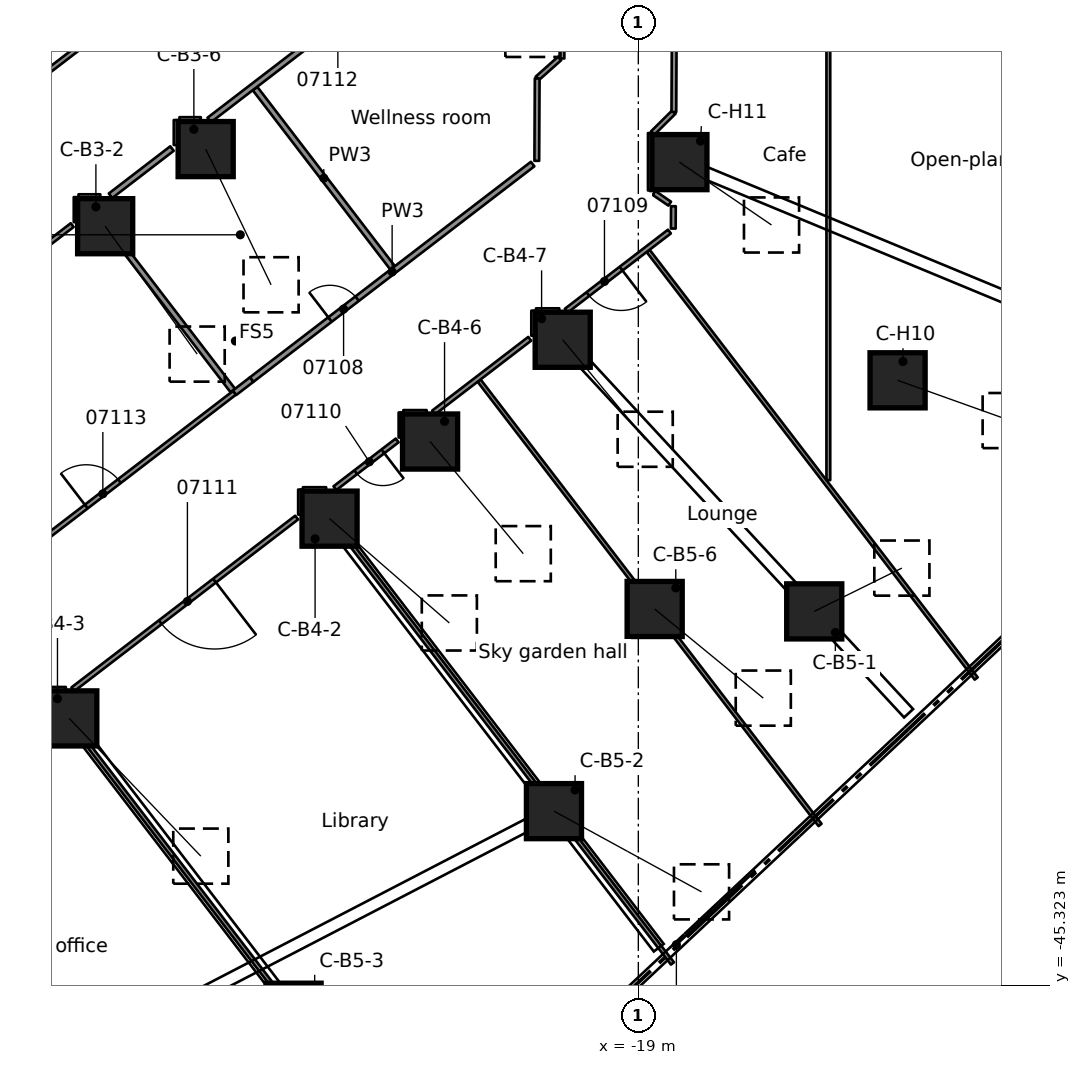
"""IFC4 building model, lengths in metres.
Left out: names, types, materials, properties, quantities, classifications, styles, units other than length and angle.
Written with IfcOpenShell. Run it as: python <this file> out.ifc"""

import sys

from ifc_helpers import new_model, si_unit, direction, frame, frame_2d, origin, origin_2d, place, context, subcontext, project, spatial, rectangle, extrude, element, fill, save


model = new_model("IFC4")
c1 = context("Model", 3, precision=1e-05, world=origin(), true_north=direction((0.0, 1.0)))
c2 = subcontext(c1, "Body", "Model", "MODEL_VIEW")
j1 = project(units=[si_unit("LENGTHUNIT", "METRE"), si_unit("PLANEANGLEUNIT", "RADIAN")], contexts=[c1])
p1 = place(None, origin())
s1 = spatial("IfcSite", under=j1, at=p1, CompositionType="ELEMENT")
p2 = place(p1, origin())
s2 = spatial("IfcBuilding", under=s1, at=p2, CompositionType="ELEMENT")
p3 = place(p2, frame((0.0, 0.0, 33.3)))
s3 = spatial("IfcBuildingStorey", under=s2, at=p3, CompositionType="ELEMENT", Elevation=33.3)
p4 = place(p3, frame((-33.03, -25.345, 0.601), z_axis=(0.484075605361, -0.672785526742, 0.559491236125), x_axis=(0.811723079597, 0.584042500208, 0.0)))
e1 = element("IfcColumn", 1, at=p4, inside=s3, PredefinedType="COLUMN", context=c2, shape_type="SweptSolid", body=[
    extrude(rectangle(XDim=1.45, YDim=1.45, at=origin_2d()), origin(), (0.0, 0.0, 1.0), 5.001),
])
p5 = place(p3, frame((-30.385, -23.316, 0.591), z_axis=(0.353875242444, -0.734106635021, 0.579534089768), x_axis=(0.90080181457, 0.434230458244, 0.0)))
e2 = element("IfcColumn", 2, at=p5, inside=s3, PredefinedType="COLUMN", context=c2, shape_type="SweptSolid", body=[
    extrude(rectangle(XDim=1.45, YDim=1.45, at=origin_2d()), origin(), (0.0, 0.0, 1.0), 4.863),
])
p6 = place(p3, frame((-27.125, -33.04, 0.603), z_axis=(0.626915434331, -0.545922874152, 0.555828439066), x_axis=(0.656712169931, 0.754141316906, 0.0)))
e3 = element("IfcColumn", 3, at=p6, inside=s3, PredefinedType="COLUMN", context=c2, shape_type="SweptSolid", body=[
    extrude(rectangle(XDim=1.45, YDim=1.45, at=origin_2d()), origin(), (0.0, 0.0, 1.0), 5.028),
])
p7 = place(p3, frame((-33.974, -38.296, 0.637), z_axis=(0.606713355896, -0.635258027433, 0.477855775689), x_axis=(0.723167492828, 0.690672699125, 0.0)))
e4 = element("IfcColumn", 4, at=p7, inside=s3, PredefinedType="COLUMN", context=c2, shape_type="SweptSolid", body=[
    extrude(rectangle(XDim=1.45, YDim=1.45, at=origin_2d()), origin(), (0.0, 0.0, 1.0), 5.705),
])
p8 = place(p3, frame((-24.48, -31.011, 0.583), z_axis=(0.514125147633, -0.618557618127, 0.594190041678), x_axis=(0.769039707257, 0.639201008026, 0.0)))
e5 = element("IfcColumn", 5, at=p8, inside=s3, PredefinedType="COLUMN", context=c2, shape_type="SweptSolid", body=[
    extrude(rectangle(XDim=1.45, YDim=1.45, at=origin_2d()), origin(), (0.0, 0.0, 1.0), 4.769),
])
p9 = place(p3, frame((-20.99, -28.333, 0.552), z_axis=(0.48599783766, -0.586072291187, 0.648325050644), x_axis=(0.769766563569, 0.638325495035, 0.0)))
e6 = element("IfcColumn", 6, at=p9, inside=s3, PredefinedType="COLUMN", context=c2, shape_type="SweptSolid", body=[
    extrude(rectangle(XDim=1.45, YDim=1.45, at=origin_2d()), origin(), (0.0, 0.0, 1.0), 4.467),
])
p10 = place(p3, frame((-14.371, -35.48, 0.466), z_axis=(0.575966078213, 0.284446512266, 0.7663897562), x_axis=(-0.44280386504, 0.896618501429, 0.0)))
e7 = element("IfcColumn", 7, at=p10, inside=s3, PredefinedType="COLUMN", context=c2, shape_type="SweptSolid", body=[
    extrude(rectangle(XDim=1.45, YDim=1.45, at=origin_2d()), origin(), (0.0, 0.0, 1.0), 4.004),
])
p11 = place(p3, frame((-21.22, -40.736, 0.615), z_axis=(0.743612862638, -0.406754599494, 0.530651115432), x_axis=(0.479895272144, 0.877325782007, 0.0)))
e8 = element("IfcColumn", 8, at=p11, inside=s3, PredefinedType="COLUMN", context=c2, shape_type="SweptSolid", body=[
    extrude(rectangle(XDim=1.45, YDim=1.45, at=origin_2d()), origin(), (0.0, 0.0, 1.0), 5.222),
])
p12 = place(p3, frame((-28.072, -45.988, 0.641), z_axis=(0.719277998117, -0.515378613328, 0.465858397314), x_axis=(0.582441324018, 0.812872747775, 0.0)))
e9 = element("IfcColumn", 9, at=p12, inside=s3, PredefinedType="COLUMN", context=c2, shape_type="SweptSolid", body=[
    extrude(rectangle(XDim=1.45, YDim=1.45, at=origin_2d()), origin(), (0.0, 0.0, 1.0), 5.832),
])
p13 = place(p3, frame((-18.57, -35.417, 0.574), z_axis=(0.612119529002, -0.502213041434, 0.610812363356), x_axis=(0.634287264239, 0.7730974495, 0.0)))
e10 = element("IfcColumn", 10, at=p13, inside=s3, PredefinedType="COLUMN", context=c2, shape_type="SweptSolid", body=[
    extrude(rectangle(XDim=1.45, YDim=1.45, at=origin_2d()), origin(), (0.0, 0.0, 1.0), 4.669),
])
p14 = place(p3, frame((-12.178, -29.4, 0.53), z_axis=(0.687967306264, -0.24591316534, 0.682808685229), x_axis=(0.33659198018, 0.941650592778, 0.0)))
e11 = element("IfcColumn", 11, at=p14, inside=s3, PredefinedType="COLUMN", context=c2, shape_type="SweptSolid", body=[
    extrude(rectangle(XDim=1.45, YDim=1.45, at=origin_2d()), origin(), (0.0, 0.0, 1.0), 4.307),
])
p15 = place(p3, frame((-17.919, -23.659, 0.508), z_axis=(0.579239562537, -0.395280825563, 0.712905742812), x_axis=(0.563672389997, 0.825998448397, 0.0)))
e12 = element("IfcColumn", 12, at=p15, inside=s3, PredefinedType="COLUMN", context=c2, shape_type="SweptSolid", body=[
    extrude(rectangle(XDim=1.45, YDim=1.45, at=origin_2d()), origin(), (0.0, 0.0, 1.0), 4.185),
])
p16 = place(p3, frame((-23.659, -17.919, 0.508), z_axis=(0.450505155937, -0.537268679687, 0.713012952408), x_axis=(0.766266875891, 0.642522431446, 0.0)))
e13 = element("IfcColumn", 13, at=p16, inside=s3, PredefinedType="COLUMN", context=c2, shape_type="SweptSolid", body=[
    extrude(rectangle(XDim=1.45, YDim=1.45, at=origin_2d()), origin(), (0.0, 0.0, 1.0), 4.184),
])
p17 = place(p3, frame((-34.501, -37.664, 0.0), z_axis=(0.0, 0.0, 1.0), x_axis=(0.608768597096, -0.793347839973, 0.0)))
e14 = element("IfcWall", 14, at=p17, inside=s3, PredefinedType="PARTITIONING", context=c2, shape_type="SweptSolid", body=[
    extrude(rectangle(XDim=16.162, YDim=0.1, at=frame_2d((8.081, 0.0))), origin(), (0.0, 0.0, 1.0), 3.56),
])
p18 = place(p3, frame((-33.482, -24.701, 0.0), z_axis=(0.0, 0.0, 1.0), x_axis=(0.608730316576, -0.793377212731, 0.0)))
e15 = element("IfcWall", 15, at=p18, inside=s3, PredefinedType="PARTITIONING", context=c2, shape_type="SweptSolid", body=[
    extrude(rectangle(XDim=6.261, YDim=0.15, at=frame_2d((3.13, 0.0))), origin(), (0.0, 0.0, 1.0), 3.56),
])
p19 = place(p3, frame((-27.599, -32.368, 0.0), z_axis=(0.0, 0.0, 1.0), x_axis=(0.608787633684, -0.793333232049, 0.0)))
e16 = element("IfcWall", 16, at=p19, inside=s3, PredefinedType="PARTITIONING", context=c2, shape_type="SweptSolid", body=[
    extrude(rectangle(XDim=15.6, YDim=0.1, at=frame_2d((7.8, 0.0))), origin(), (0.0, 0.0, 1.0), 3.56),
])
p20 = place(p3, frame((-29.087, -21.722, 0.0), z_axis=(0.0, 0.0, 1.0), x_axis=(0.608744291625, -0.793366489975, 0.0)))
e17 = element("IfcWall", 17, at=p20, inside=s3, PredefinedType="PARTITIONING", context=c2, shape_type="SweptSolid", body=[
    extrude(rectangle(XDim=5.948, YDim=0.15, at=frame_2d((2.974, 0.0))), origin(), (0.0, 0.0, 1.0), 3.56),
])
p21 = place(p3, frame((-23.19, -29.408, 0.0), z_axis=(0.0, 0.0, 1.0), x_axis=(0.608771263508, -0.793345793917, 0.0)))
e18 = element("IfcWall", 18, at=p21, inside=s3, PredefinedType="PARTITIONING", context=c2, shape_type="SweptSolid", body=[
    extrude(rectangle(XDim=14.738, YDim=0.1, at=frame_2d((7.369, 0.0))), origin(), (0.0, 0.0, 1.0), 3.56),
])
p22 = place(p3, frame((-18.742, -25.995, 0.0), z_axis=(0.0, 0.0, 1.0), x_axis=(0.608756044644, -0.79335747183, 0.0)))
e19 = element("IfcWall", 19, at=p22, inside=s3, PredefinedType="PARTITIONING", context=c2, shape_type="SweptSolid", body=[
    extrude(rectangle(XDim=14.181, YDim=0.1, at=frame_2d((7.091, 0.0))), origin(), (0.0, 0.0, 1.0), 3.56),
])
p23 = place(p3, frame((-18.586, -24.471, 0.0), z_axis=(0.0, 0.0, 1.0), x_axis=(0.8260511917, -0.563595092855, 0.0)))
e20 = element("IfcWall", 20, at=p23, inside=s3, PredefinedType="PARTITIONING", context=c2, shape_type="SweptSolid", body=[
    extrude(rectangle(XDim=0.499, YDim=0.125, at=frame_2d((0.249, 0.0))), origin(), (0.0, 0.0, 1.0), 3.56),
])
p24 = place(p3, frame((-34.541, -37.531, 0.0), z_axis=(0.0, 0.0, 1.0), x_axis=(1.0, 0.0, 0.0)))
e21 = element("IfcWall", 21, at=p24, inside=s3, PredefinedType="PARTITIONING", context=c2, shape_type="SweptSolid", body=[
    extrude(rectangle(XDim=0.477, YDim=0.125, at=frame_2d((0.239, 0.0))), origin(), (0.0, 0.0, 1.0), 3.56),
])
p25 = place(p3, frame((-27.826, -32.275, 0.0), z_axis=(0.0, 0.0, 1.0), x_axis=(1.0, 0.0, 0.0)))
e22 = element("IfcWall", 22, at=p25, inside=s3, PredefinedType="PARTITIONING", context=c2, shape_type="SweptSolid", body=[
    extrude(rectangle(XDim=0.611, YDim=0.125, at=frame_2d((0.305, 0.0))), origin(), (0.0, 0.0, 1.0), 3.56),
])
p26 = place(p3, frame((-25.183, -30.246, 0.0), z_axis=(0.0, 0.0, 1.0), x_axis=(1.0, 0.0, 0.0)))
e23 = element("IfcWall", 23, at=p26, inside=s3, PredefinedType="PARTITIONING", context=c2, shape_type="SweptSolid", body=[
    extrude(rectangle(XDim=0.613, YDim=0.125, at=frame_2d((0.307, 0.0))), origin(), (0.0, 0.0, 1.0), 3.56),
])
p27 = place(p3, frame((-21.692, -27.568, 0.0), z_axis=(0.0, 0.0, 1.0), x_axis=(1.0, 0.0, 0.0)))
e24 = element("IfcWall", 24, at=p27, inside=s3, PredefinedType="PARTITIONING", context=c2, shape_type="SweptSolid", body=[
    extrude(rectangle(XDim=0.612, YDim=0.125, at=frame_2d((0.306, 0.0))), origin(), (0.0, 0.0, 1.0), 3.56),
])
p28 = place(p3, frame((-33.731, -24.58, 0.0), z_axis=(0.0, 0.0, 1.0), x_axis=(1.0, 0.0, 0.0)))
e25 = element("IfcWall", 25, at=p28, inside=s3, PredefinedType="PARTITIONING", context=c2, shape_type="SweptSolid", body=[
    extrude(rectangle(XDim=0.573, YDim=0.15, at=frame_2d((0.287, 0.0))), origin(), (0.0, 0.0, 1.0), 3.56),
])
p29 = place(p3, frame((-18.622, -22.894, 0.0), z_axis=(0.0, 0.0, 1.0), x_axis=(0.70974550127, 0.704458177202, 0.0)))
e26 = element("IfcWall", 26, at=p29, inside=s3, PredefinedType="PARTITIONING", context=c2, shape_type="SweptSolid", body=[
    extrude(rectangle(XDim=0.785, YDim=0.125, at=frame_2d((0.393, 0.0))), origin(), (0.0, 0.0, 1.0), 3.56),
])
p30 = place(p3, frame((-31.075, -22.551, 0.0), z_axis=(0.0, 0.0, 1.0), x_axis=(1.0, 0.0, 0.0)))
e27 = element("IfcWall", 27, at=p30, inside=s3, PredefinedType="PARTITIONING", context=c2, shape_type="SweptSolid", body=[
    extrude(rectangle(XDim=0.562, YDim=0.15, at=frame_2d((0.281, 0.0))), origin(), (0.0, 0.0, 1.0), 3.56),
])
p31 = place(p3, frame((-21.661, -21.457, 0.0), z_axis=(0.0, 0.0, 1.0), x_axis=(0.746332821082, 0.665572926264, 0.0)))
e28 = element("IfcWall", 28, at=p31, inside=s3, PredefinedType="PARTITIONING", context=c2, shape_type="SweptSolid", body=[
    extrude(rectangle(XDim=0.789, YDim=0.125, at=frame_2d((0.395, 0.0))), origin(), (0.0, 0.0, 1.0), 3.56),
])
p32 = place(p3, frame((-27.991, -33.012, 0.0), z_axis=(0.0, 0.0, 1.0), x_axis=(-0.793332599064, -0.608788458549, 0.0)))
e29 = element("IfcWall", 29, at=p32, inside=s3, PredefinedType="PARTITIONING", context=c2, shape_type="SweptSolid", body=[
    extrude(rectangle(XDim=7.423, YDim=0.125, at=frame_2d((3.711, 0.0))), origin(), (0.0, 0.0, 1.0), 3.56),
])
p33 = place(p32, frame((2.723, 0.0, 0.0)))
e30 = element("IfcOpeningElement", 30, at=p33, cuts=e29, PredefinedType="OPENING", context=c2, shape_type="SweptSolid", body=[
    extrude(rectangle(XDim=1.8, YDim=2.1, at=frame_2d((0.9, 1.05))), frame((0.0, 0.073, 0.0), z_axis=(0.0, -1.0, 0.0), x_axis=(1.0, 0.0, 0.0)), (0.0, 0.0, 1.0), 0.145),
])
p34 = place(p3, frame((-25.346, -30.982, 0.0), z_axis=(0.0, 0.0, 1.0), x_axis=(-0.79329604463, -0.608836090893, 0.0)))
e31 = element("IfcWall", 31, at=p34, inside=s3, PredefinedType="PARTITIONING", context=c2, shape_type="SweptSolid", body=[
    extrude(rectangle(XDim=2.065, YDim=0.125, at=frame_2d((1.032, 0.0))), origin(), (0.0, 0.0, 1.0), 3.56),
])
p35 = place(p34, frame((0.473, 0.0, 0.0)))
e32 = element("IfcOpeningElement", 32, at=p35, cuts=e31, PredefinedType="OPENING", context=c2, shape_type="SweptSolid", body=[
    extrude(rectangle(XDim=0.9, YDim=2.1, at=frame_2d((0.45, 1.05))), frame((0.0, 0.073, 0.0), z_axis=(0.0, -1.0, 0.0), x_axis=(1.0, 0.0, 0.0)), (0.0, 0.0, 1.0), 0.145),
])
p36 = place(p3, frame((-24.386, -30.246, 0.0), z_axis=(0.0, 0.0, 1.0), x_axis=(0.793523683955, 0.60853936849, 0.0)))
e33 = element("IfcWall", 33, at=p36, inside=s3, PredefinedType="PARTITIONING", context=c2, shape_type="SweptSolid", body=[
    extrude(rectangle(XDim=3.185, YDim=0.125, at=frame_2d((1.592, 0.0))), origin(), (0.0, 0.0, 1.0), 3.56),
])
p37 = place(p3, frame((-18.182, -25.486, 0.0), z_axis=(0.0, 0.0, 1.0), x_axis=(-0.793435168534, -0.608654773523, 0.0)))
e34 = element("IfcWall", 34, at=p37, inside=s3, PredefinedType="PARTITIONING", context=c2, shape_type="SweptSolid", body=[
    extrude(rectangle(XDim=3.421, YDim=0.125, at=frame_2d((1.71, 0.0))), origin(), (0.0, 0.0, 1.0), 3.56),
])
p38 = place(p37, frame((1.604, 0.0, 0.0)))
e35 = element("IfcOpeningElement", 35, at=p38, cuts=e34, PredefinedType="OPENING", context=c2, shape_type="SweptSolid", body=[
    extrude(rectangle(XDim=1.1, YDim=2.1, at=frame_2d((0.55, 1.05))), frame((0.0, 0.073, 0.0), z_axis=(0.0, -1.0, 0.0), x_axis=(1.0, 0.0, 0.0)), (0.0, 0.0, 1.0), 0.145),
])
p39 = place(p3, frame((-36.283, -34.836, 0.0), z_axis=(0.0, 0.0, 1.0), x_axis=(0.793406369961, 0.608692313165, 0.0)))
e36 = element("IfcWall", 36, at=p39, inside=s3, PredefinedType="PARTITIONING", context=c2, shape_type="SweptSolid", body=[
    extrude(rectangle(XDim=8.392, YDim=0.125, at=frame_2d((4.196, 0.0))), origin(), (0.0, 0.0, 1.0), 3.56),
])
p40 = place(p39, frame((3.473, 0.0, 0.0)))
e37 = element("IfcOpeningElement", 37, at=p40, cuts=e36, PredefinedType="OPENING", context=c2, shape_type="SweptSolid", body=[
    extrude(rectangle(XDim=1.1, YDim=2.1, at=frame_2d((0.55, 1.05))), frame((0.0, 0.073, 0.0), z_axis=(0.0, -1.0, 0.0), x_axis=(1.0, 0.0, 0.0)), (0.0, 0.0, 1.0), 0.145),
])
p41 = place(p3, frame((-29.176, -29.382, 0.0), z_axis=(0.0, 0.0, 1.0), x_axis=(0.793471421385, 0.608607511821, 0.0)))
e38 = element("IfcWall", 38, at=p41, inside=s3, PredefinedType="PARTITIONING", context=c2, shape_type="SweptSolid", body=[
    extrude(rectangle(XDim=9.32, YDim=0.15, at=frame_2d((4.66, 0.0))), origin(), (0.0, 0.0, 1.0), 3.56),
])
p42 = place(p41, frame((2.6, 0.0, 0.0)))
e39 = element("IfcOpeningElement", 39, at=p42, cuts=e38, PredefinedType="OPENING", context=c2, shape_type="SweptSolid", body=[
    extrude(rectangle(XDim=0.9, YDim=2.1, at=frame_2d((0.45, 1.05))), frame((0.0, 0.085, 0.0), z_axis=(0.0, -1.0, 0.0), x_axis=(1.0, 0.0, 0.0)), (0.0, 0.0, 1.0), 0.17),
])
p43 = place(p3, frame((-29.625, -29.727, 0.0), z_axis=(0.0, 0.0, 1.0), x_axis=(0.792960485916, 0.609273065035, 0.0)))
e40 = element("IfcWall", 40, at=p43, inside=s3, PredefinedType="PARTITIONING", context=c2, shape_type="SweptSolid", body=[
    extrude(rectangle(XDim=0.566, YDim=0.15, at=frame_2d((0.283, 0.0))), origin(), (0.0, 0.0, 1.0), 3.56),
])
p44 = place(p3, frame((-39.784, -29.835, 0.0), z_axis=(0.0, 0.0, 1.0), x_axis=(0.793235050969, 0.608915555652, 0.0)))
e41 = element("IfcWall", 41, at=p44, inside=s3, PredefinedType="PARTITIONING", context=c2, shape_type="SweptSolid", body=[
    extrude(rectangle(XDim=7.421, YDim=0.125, at=frame_2d((3.711, 0.0))), origin(), (0.0, 0.0, 1.0), 3.56),
])
p45 = place(p3, frame((-32.889, -24.544, 0.0), z_axis=(0.0, 0.0, 1.0), x_axis=(0.793242097783, 0.608906375648, 0.0)))
e42 = element("IfcWall", 42, at=p45, inside=s3, PredefinedType="PARTITIONING", context=c2, shape_type="SweptSolid", body=[
    extrude(rectangle(XDim=2.04, YDim=0.15, at=frame_2d((1.02, 0.0))), origin(), (0.0, 0.0, 1.0), 3.56),
])
p46 = place(p3, frame((-24.685, -18.25, 0.0), z_axis=(0.0, 0.0, 1.0), x_axis=(-0.793443961698, -0.608643310687, 0.0)))
e43 = element("IfcWall", 43, at=p46, inside=s3, PredefinedType="PARTITIONING", context=c2, shape_type="SweptSolid", body=[
    extrude(rectangle(XDim=7.067, YDim=0.15, at=frame_2d((3.533, 0.0))), origin(), (0.0, 0.0, 1.0), 3.56),
])
p47 = place(p46, frame((2.35, 0.0, 0.0)))
e44 = element("IfcOpeningElement", 44, at=p47, cuts=e43, PredefinedType="OPENING", context=c2, shape_type="SweptSolid", body=[
    extrude(rectangle(XDim=0.9, YDim=2.1, at=frame_2d((0.45, 1.05))), frame((0.0, 0.085, 0.0), z_axis=(0.0, -1.0, 0.0), x_axis=(1.0, 0.0, 0.0)), (0.0, 0.0, 1.0), 0.17),
])
p48 = place(p3, frame((-35.081, -21.687, 0.0), z_axis=(0.0, 0.0, 1.0), x_axis=(0.793358624224, 0.608754542792, 0.0)))
e45 = element("IfcWall", 45, at=p48, inside=s3, PredefinedType="PARTITIONING", context=c2, shape_type="SweptSolid", body=[
    extrude(rectangle(XDim=9.567, YDim=0.125, at=frame_2d((4.784, 0.0))), origin(), (0.0, 0.0, 1.0), 3.56),
])
p49 = place(p48, frame((6.334, 0.0, 0.0)))
e46 = element("IfcOpeningElement", 46, at=p49, cuts=e45, PredefinedType="OPENING", context=c2, shape_type="SweptSolid", body=[
    extrude(rectangle(XDim=1.8, YDim=2.1, at=frame_2d((0.9, 1.05))), frame((0.0, 0.073, 0.0), z_axis=(0.0, -1.0, 0.0), x_axis=(1.0, 0.0, 0.0)), (0.0, 0.0, 1.0), 0.145),
])
p50 = place(p48, frame((1.85, 0.0, 0.0)))
e47 = element("IfcOpeningElement", 47, at=p50, cuts=e45, PredefinedType="OPENING", context=c2, shape_type="SweptSolid", body=[
    extrude(rectangle(XDim=1.1, YDim=2.1, at=frame_2d((0.55, 1.05))), frame((0.0, 0.073, 0.0), z_axis=(0.0, -1.0, 0.0), x_axis=(1.0, 0.0, 0.0)), (0.0, 0.0, 1.0), 0.145),
])
p51 = place(p3, frame((-18.08, -25.407, 0.0), z_axis=(0.0, 0.0, 1.0), x_axis=(0.005398592424, 0.999985427494, 0.0)))
e48 = element("IfcWall", 48, at=p51, inside=s3, PredefinedType="PARTITIONING", context=c2, shape_type="SweptSolid", body=[
    extrude(rectangle(XDim=0.588, YDim=0.125, at=frame_2d((0.294, 0.0))), origin(), (0.0, 0.0, 1.0), 3.56),
])
p52 = place(p3, frame((-18.065, -22.341, 0.0), z_axis=(0.0, 0.0, 1.0), x_axis=(0.004875578002, 0.999988114299, 0.0)))
e49 = element("IfcWall", 49, at=p52, inside=s3, PredefinedType="PARTITIONING", context=c2, shape_type="SweptSolid", body=[
    extrude(rectangle(XDim=3.455, YDim=0.125, at=frame_2d((1.728, 0.0))), origin(), (0.0, 0.0, 1.0), 3.56),
])
p53 = place(p3, frame((-21.672, -23.625, 0.0), z_axis=(0.0, 0.0, 1.0), x_axis=(0.005180110678, 0.999986583137, 0.0)))
e50 = element("IfcWall", 50, at=p53, inside=s3, PredefinedType="PARTITIONING", context=c2, shape_type="SweptSolid", body=[
    extrude(rectangle(XDim=2.168, YDim=0.125, at=frame_2d((1.084, 0.0))), origin(), (0.0, 0.0, 1.0), 3.56),
])
p54 = place(p3, frame((-14.0, -32.027, 0.0), z_axis=(0.0, 0.0, 1.0), x_axis=(0.0, 1.0, 0.0)))
e51 = element("IfcWall", 51, at=p54, inside=s3, PredefinedType="PARTITIONING", context=c2, shape_type="SweptSolid", body=[
    extrude(rectangle(XDim=16.913, YDim=0.1, at=frame_2d((8.457, 0.0))), origin(), (0.0, 0.0, 1.0), 3.56),
])
p55 = place(p3, frame((-18.684, -24.405, 0.0), z_axis=(0.0, 0.0, 1.0), x_axis=(0.0, 1.0, 0.0)))
e52 = element("IfcWall", 52, at=p55, inside=s3, PredefinedType="PARTITIONING", context=c2, shape_type="SweptSolid", body=[
    extrude(rectangle(XDim=1.511, YDim=0.125, at=frame_2d((0.755, 0.0))), origin(), (0.0, 0.0, 1.0), 3.56),
])
p56 = place(p3, frame((-21.009, -20.932, 0.0), z_axis=(0.0, 0.0, 1.0), x_axis=(0.0, 1.0, 0.0)))
e53 = element("IfcWall", 53, at=p56, inside=s3, PredefinedType="PARTITIONING", context=c2, shape_type="SweptSolid", body=[
    extrude(rectangle(XDim=1.505, YDim=0.125, at=frame_2d((0.752, 0.0))), origin(), (0.0, 0.0, 1.0), 3.56),
])
for number, where, z_axis, x_axis in (
    (54, (-21.754, -28.227, 0.0), (0.0, 0.0, 1.0), (0.0, 1.0, 0.0)),
    (55, (-25.245, -30.905, 0.0), (0.0, 0.0, 1.0), (0.0, 1.0, 0.0)),
):
    element("IfcWall", number, at=place(p3, frame(where, z_axis=z_axis, x_axis=x_axis)), inside=s3, PredefinedType="PARTITIONING", context=c2, shape_type="SweptSolid", body=[
        extrude(rectangle(XDim=0.659, YDim=0.125, at=frame_2d((0.33, 0.0))), origin(), (0.0, 0.0, 1.0), 3.56),
    ])
p57 = place(p3, frame((-27.889, -32.934, 0.0), z_axis=(0.0, 0.0, 1.0), x_axis=(0.0, 1.0, 0.0)))
e56 = element("IfcWall", 56, at=p57, inside=s3, PredefinedType="PARTITIONING", context=c2, shape_type="SweptSolid", body=[
    extrude(rectangle(XDim=0.659, YDim=0.125, at=frame_2d((0.33, 0.0))), origin(), (0.0, 0.0, 1.0), 3.56),
])
p58 = place(p3, frame((-31.15, -23.209, 0.0), z_axis=(0.0, 0.0, 1.0), x_axis=(0.0, 1.0, 0.0)))
e57 = element("IfcWall", 57, at=p58, inside=s3, PredefinedType="PARTITIONING", context=c2, shape_type="SweptSolid", body=[
    extrude(rectangle(XDim=0.658, YDim=0.15, at=frame_2d((0.329, 0.0))), origin(), (0.0, 0.0, 1.0), 3.56),
])
p59 = place(p3, frame((-33.794, -25.239, 0.0), z_axis=(0.0, 0.0, 1.0), x_axis=(0.0, 1.0, 0.0)))
e58 = element("IfcWall", 58, at=p59, inside=s3, PredefinedType="PARTITIONING", context=c2, shape_type="SweptSolid", body=[
    extrude(rectangle(XDim=0.659, YDim=0.125, at=frame_2d((0.33, 0.0))), origin(), (0.0, 0.0, 1.0), 3.56),
])
p60 = place(p42, origin())
e59 = element("IfcDoor", 59, at=p60, inside=s3, OperationType="SINGLE_SWING_LEFT", PredefinedType="DOOR", context=c2, shape_type="SweptSolid", body=[
    extrude(rectangle(XDim=0.9, YDim=2.1, at=frame_2d((0.45, 1.05))), frame((0.0, 0.025, 0.0), z_axis=(0.0, -1.0, 0.0), x_axis=(1.0, 0.0, 0.0)), (0.0, 0.0, 1.0), 0.05),
])
fill(e39, e59)
p61 = place(p38, origin())
e60 = element("IfcDoor", 60, at=p61, inside=s3, OperationType="SINGLE_SWING_RIGHT", PredefinedType="DOOR", context=c2, shape_type="SweptSolid", body=[
    extrude(rectangle(XDim=1.1, YDim=2.1, at=frame_2d((0.55, 1.05))), frame((0.0, 0.025, 0.0), z_axis=(0.0, -1.0, 0.0), x_axis=(1.0, 0.0, 0.0)), (0.0, 0.0, 1.0), 0.05),
])
fill(e35, e60)
p62 = place(p35, origin())
e61 = element("IfcDoor", 61, at=p62, inside=s3, OperationType="SINGLE_SWING_LEFT", PredefinedType="DOOR", context=c2, shape_type="SweptSolid", body=[
    extrude(rectangle(XDim=0.9, YDim=2.1, at=frame_2d((0.45, 1.05))), frame((0.0, 0.025, 0.0), z_axis=(0.0, -1.0, 0.0), x_axis=(1.0, 0.0, 0.0)), (0.0, 0.0, 1.0), 0.05),
])
fill(e32, e61)
p63 = place(p33, origin())
e62 = element("IfcDoor", 62, at=p63, inside=s3, OperationType="DOUBLE_DOOR_SINGLE_SWING", PredefinedType="DOOR", context=c2, shape_type="SweptSolid", body=[
    extrude(rectangle(XDim=1.8, YDim=2.1, at=frame_2d((0.9, 1.05))), frame((0.0, 0.025, 0.0), z_axis=(0.0, -1.0, 0.0), x_axis=(1.0, 0.0, 0.0)), (0.0, 0.0, 1.0), 0.05),
])
fill(e30, e62)
p64 = place(p40, origin())
e63 = element("IfcDoor", 63, at=p64, inside=s3, OperationType="SINGLE_SWING_LEFT", PredefinedType="DOOR", context=c2, shape_type="SweptSolid", body=[
    extrude(rectangle(XDim=1.1, YDim=2.1, at=frame_2d((0.55, 1.05))), frame((0.0, 0.025, 0.0), z_axis=(0.0, -1.0, 0.0), x_axis=(1.0, 0.0, 0.0)), (0.0, 0.0, 1.0), 0.05),
])
fill(e37, e63)
save(model, sys.argv[1])
